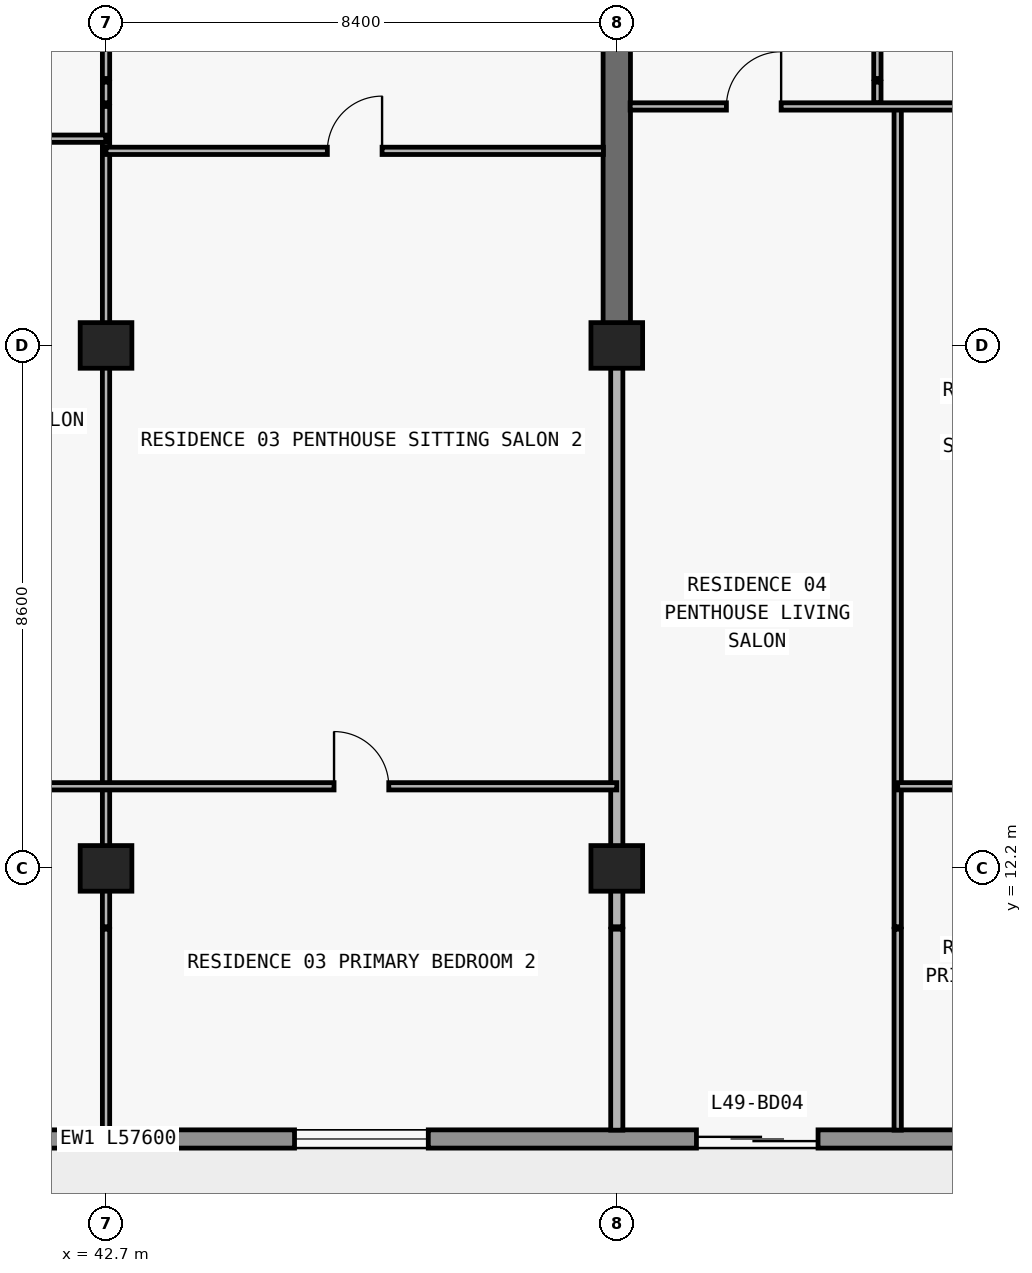
"""IFC4 building model, lengths in metres.
Left out: names, types, materials, properties, quantities, classifications, styles, units other than length and angle.
Written with IfcOpenShell. Run it as: python <this file> out.ifc"""

import sys

from ifc_helpers import new_model, si_unit, direction, frame, frame_2d, origin, origin_2d, place, context, subcontext, project, spatial, rectangle, extrude, element, fill, save


model = new_model("IFC4")
c1 = context("Model", 3, precision=1e-05, world=origin(), true_north=direction((0.0, 1.0)))
c2 = subcontext(c1, "Body", "Model", "MODEL_VIEW")
j1 = project(units=[si_unit("LENGTHUNIT", "METRE"), si_unit("PLANEANGLEUNIT", "RADIAN")], contexts=[c1])
p1 = place(None, origin())
s1 = spatial("IfcSite", under=j1, at=p1, CompositionType="ELEMENT")
p2 = place(p1, origin())
s2 = spatial("IfcBuilding", under=s1, at=p2, CompositionType="ELEMENT")
p3 = place(p2, frame((0.0, 0.0, 177.0)))
s3 = spatial("IfcBuildingStorey", under=s2, at=p3, CompositionType="ELEMENT", Elevation=177.0)
for number, where, z_axis, x_axis in (
    (1, (42.7, 12.2, 0.0), (0.0, 0.0, 1.0), (1.0, 0.0, 0.0)),
    (2, (51.1, 12.2, 0.0), (0.0, 0.0, 1.0), (1.0, 0.0, 0.0)),
    (3, (42.7, 20.8, 0.0), (0.0, 0.0, 1.0), (1.0, 0.0, 0.0)),
    (4, (51.1, 20.8, 0.0), (0.0, 0.0, 1.0), (1.0, 0.0, 0.0)),
):
    element("IfcColumn", number, at=place(p3, frame(where, z_axis=z_axis, x_axis=x_axis)), inside=s3, PredefinedType="COLUMN", context=c2, shape_type="SweptSolid", body=[
        extrude(rectangle(XDim=0.85, YDim=0.75, at=origin_2d()), origin(), (0.0, 0.0, 1.0), 3.05),
    ])
p4 = place(p3, frame((51.1, 20.8, 0.0), z_axis=(0.0, 0.0, 1.0), x_axis=(0.0, 1.0, 0.0)))
e5 = element("IfcWall", 5, at=p4, inside=s3, PredefinedType="SHEAR", context=c2, shape_type="SweptSolid", body=[
    extrude(rectangle(XDim=8.6, YDim=0.45, at=frame_2d((4.3, 0.0))), origin(), (0.0, 0.0, 1.0), 3.05),
])
p5 = place(p3, frame((67.7, 7.75, 0.0), z_axis=(0.0, 0.0, 1.0), x_axis=(-1.0, 0.0, 0.0)))
e6 = element("IfcWall", 6, at=p5, inside=s3, PredefinedType="STANDARD", context=c2, shape_type="SweptSolid", body=[
    extrude(rectangle(XDim=57.6, YDim=0.3, at=frame_2d((28.8, 0.0))), origin(), (0.0, 0.0, 1.0), 3.05),
])
p6 = place(p5, frame((54.673, 0.0, 0.0)))
e7 = element("IfcOpeningElement", 7, at=p6, cuts=e6, PredefinedType="OPENING", context=c2, shape_type="SweptSolid", body=[
    extrude(rectangle(XDim=2.0, YDim=2.3, at=frame_2d((1.0, 1.15))), frame((0.0, 0.16, 0.0), z_axis=(0.0, -1.0, 0.0), x_axis=(1.0, 0.0, 0.0)), (0.0, 0.0, 1.0), 0.32),
])
p7 = place(p5, frame((50.473, 0.0, 0.85)))
e8 = element("IfcOpeningElement", 8, at=p7, cuts=e6, PredefinedType="OPENING", context=c2, shape_type="SweptSolid", body=[
    extrude(rectangle(XDim=2.2, YDim=1.55, at=frame_2d((1.1, 0.775))), frame((0.0, 0.16, 0.0), z_axis=(0.0, -1.0, 0.0), x_axis=(1.0, 0.0, 0.0)), (0.0, 0.0, 1.0), 0.32),
])
p8 = place(p5, frame((46.09, 0.0, 0.0)))
e9 = element("IfcOpeningElement", 9, at=p8, cuts=e6, PredefinedType="OPENING", context=c2, shape_type="SweptSolid", body=[
    extrude(rectangle(XDim=2.0, YDim=2.3, at=frame_2d((1.0, 1.15))), frame((0.0, 0.16, 0.0), z_axis=(0.0, -1.0, 0.0), x_axis=(1.0, 0.0, 0.0)), (0.0, 0.0, 1.0), 0.32),
])
p9 = place(p5, frame((41.99, 0.0, 0.85)))
e10 = element("IfcOpeningElement", 10, at=p9, cuts=e6, PredefinedType="OPENING", context=c2, shape_type="SweptSolid", body=[
    extrude(rectangle(XDim=1.8, YDim=1.55, at=frame_2d((0.9, 0.775))), frame((0.0, 0.16, 0.0), z_axis=(0.0, -1.0, 0.0), x_axis=(1.0, 0.0, 0.0)), (0.0, 0.0, 1.0), 0.32),
])
p10 = place(p5, frame((38.09, 0.0, 0.0)))
e11 = element("IfcOpeningElement", 11, at=p10, cuts=e6, PredefinedType="OPENING", context=c2, shape_type="SweptSolid", body=[
    extrude(rectangle(XDim=2.0, YDim=2.3, at=frame_2d((1.0, 1.15))), frame((0.0, 0.16, 0.0), z_axis=(0.0, -1.0, 0.0), x_axis=(1.0, 0.0, 0.0)), (0.0, 0.0, 1.0), 0.32),
])
p11 = place(p5, frame((33.41, 0.0, 0.65)))
e12 = element("IfcOpeningElement", 12, at=p11, cuts=e6, PredefinedType="OPENING", context=c2, shape_type="SweptSolid", body=[
    extrude(rectangle(XDim=2.6, YDim=1.85, at=frame_2d((1.3, 0.925))), frame((0.0, 0.16, 0.0), z_axis=(0.0, -1.0, 0.0), x_axis=(1.0, 0.0, 0.0)), (0.0, 0.0, 1.0), 0.32),
])
p12 = place(p5, frame((27.7, 0.0, 0.85)))
e13 = element("IfcOpeningElement", 13, at=p12, cuts=e6, PredefinedType="OPENING", context=c2, shape_type="SweptSolid", body=[
    extrude(rectangle(XDim=2.2, YDim=1.55, at=frame_2d((1.1, 0.775))), frame((0.0, 0.16, 0.0), z_axis=(0.0, -1.0, 0.0), x_axis=(1.0, 0.0, 0.0)), (0.0, 0.0, 1.0), 0.32),
])
p13 = place(p5, frame((19.7, 0.0, 0.85)))
e14 = element("IfcOpeningElement", 14, at=p13, cuts=e6, PredefinedType="OPENING", context=c2, shape_type="SweptSolid", body=[
    extrude(rectangle(XDim=2.2, YDim=1.55, at=frame_2d((1.1, 0.775))), frame((0.0, 0.16, 0.0), z_axis=(0.0, -1.0, 0.0), x_axis=(1.0, 0.0, 0.0)), (0.0, 0.0, 1.0), 0.32),
])
p14 = place(p5, frame((13.29, 0.0, 0.0)))
e15 = element("IfcOpeningElement", 15, at=p14, cuts=e6, PredefinedType="OPENING", context=c2, shape_type="SweptSolid", body=[
    extrude(rectangle(XDim=2.0, YDim=2.3, at=frame_2d((1.0, 1.15))), frame((0.0, 0.16, 0.0), z_axis=(0.0, -1.0, 0.0), x_axis=(1.0, 0.0, 0.0)), (0.0, 0.0, 1.0), 0.32),
])
p15 = place(p5, frame((9.19, 0.0, 0.85)))
e16 = element("IfcOpeningElement", 16, at=p15, cuts=e6, PredefinedType="OPENING", context=c2, shape_type="SweptSolid", body=[
    extrude(rectangle(XDim=1.8, YDim=1.55, at=frame_2d((0.9, 0.775))), frame((0.0, 0.16, 0.0), z_axis=(0.0, -1.0, 0.0), x_axis=(1.0, 0.0, 0.0)), (0.0, 0.0, 1.0), 0.32),
])
p16 = place(p5, frame((5.273, 0.0, 0.0)))
e17 = element("IfcOpeningElement", 17, at=p16, cuts=e6, PredefinedType="OPENING", context=c2, shape_type="SweptSolid", body=[
    extrude(rectangle(XDim=2.0, YDim=2.3, at=frame_2d((1.0, 1.15))), frame((0.0, 0.16, 0.0), z_axis=(0.0, -1.0, 0.0), x_axis=(1.0, 0.0, 0.0)), (0.0, 0.0, 1.0), 0.32),
])
p17 = place(p5, frame((1.073, 0.0, 0.85)))
e18 = element("IfcOpeningElement", 18, at=p17, cuts=e6, PredefinedType="OPENING", context=c2, shape_type="SweptSolid", body=[
    extrude(rectangle(XDim=2.2, YDim=1.55, at=frame_2d((1.1, 0.775))), frame((0.0, 0.16, 0.0), z_axis=(0.0, -1.0, 0.0), x_axis=(1.0, 0.0, 0.0)), (0.0, 0.0, 1.0), 0.32),
])
p18 = place(p3, frame((42.7, 7.895, 0.0), z_axis=(0.0, 0.0, 1.0), x_axis=(0.0, 1.0, 0.0)))
e19 = element("IfcWall", 19, at=p18, inside=s3, PredefinedType="PARTITIONING", context=c2, shape_type="SweptSolid", body=[
    extrude(rectangle(XDim=3.305, YDim=0.12, at=frame_2d((1.652, 0.0))), origin(), (0.0, 0.0, 1.0), 3.05),
])
p19 = place(p3, frame((42.7, 11.24, 0.0), z_axis=(0.0, 0.0, 1.0), x_axis=(0.0, 1.0, 0.0)))
e20 = element("IfcWall", 20, at=p19, inside=s3, PredefinedType="PARTITIONING", context=c2, shape_type="SweptSolid", body=[
    extrude(rectangle(XDim=13.49, YDim=0.12, at=frame_2d((6.745, 0.0))), origin(), (0.0, 0.0, 1.0), 2.263),
])
p20 = place(p3, frame((42.7, 24.79, 0.0), z_axis=(0.0, 0.0, 1.0), x_axis=(0.0, 1.0, 0.0)))
e21 = element("IfcWall", 21, at=p20, inside=s3, PredefinedType="PARTITIONING", context=c2, shape_type="SweptSolid", body=[
    extrude(rectangle(XDim=0.34, YDim=0.12, at=frame_2d((0.17, 0.0))), origin(), (0.0, 0.0, 1.0), 2.263),
])
p21 = place(p3, frame((42.7, 25.19, 0.0), z_axis=(0.0, 0.0, 1.0), x_axis=(0.0, 1.0, 0.0)))
e22 = element("IfcWall", 22, at=p21, inside=s3, PredefinedType="PARTITIONING", context=c2, shape_type="SweptSolid", body=[
    extrude(rectangle(XDim=4.69, YDim=0.12, at=frame_2d((2.345, 0.0))), origin(), (0.0, 0.0, 1.0), 2.263),
])
p22 = place(p21, frame((1.255, 0.0, 0.0)))
e23 = element("IfcOpeningElement", 23, at=p22, cuts=e22, PredefinedType="OPENING", context=c2, shape_type="SweptSolid", body=[
    extrude(rectangle(XDim=0.9, YDim=2.15, at=frame_2d((0.45, 1.075))), frame((0.0, 0.07, 0.0), z_axis=(0.0, -1.0, 0.0), x_axis=(1.0, 0.0, 0.0)), (0.0, 0.0, 1.0), 0.14),
])
p23 = place(p3, frame((51.1, 7.895, 0.0), z_axis=(0.0, 0.0, 1.0), x_axis=(0.0, 1.0, 0.0)))
e24 = element("IfcWall", 24, at=p23, inside=s3, PredefinedType="PARTITIONING", context=c2, shape_type="SweptSolid", body=[
    extrude(rectangle(XDim=3.305, YDim=0.2, at=frame_2d((1.652, 0.0))), origin(), (0.0, 0.0, 1.0), 3.05),
])
p24 = place(p3, frame((51.1, 11.24, 0.0), z_axis=(0.0, 0.0, 1.0), x_axis=(0.0, 1.0, 0.0)))
e25 = element("IfcWall", 25, at=p24, inside=s3, PredefinedType="PARTITIONING", context=c2, shape_type="SweptSolid", body=[
    extrude(rectangle(XDim=9.555, YDim=0.2, at=frame_2d((4.777, 0.0))), origin(), (0.0, 0.0, 1.0), 2.263),
])
p25 = place(p3, frame((55.386, 24.79, 0.0), z_axis=(0.0, 0.0, 1.0), x_axis=(0.0, 1.0, 0.0)))
e26 = element("IfcWall", 26, at=p25, inside=s3, PredefinedType="PARTITIONING", context=c2, shape_type="SweptSolid", body=[
    extrude(rectangle(XDim=0.34, YDim=0.12, at=frame_2d((0.17, 0.0))), origin(), (0.0, 0.0, 1.0), 2.499),
])
p26 = place(p3, frame((55.386, 25.19, 0.0), z_axis=(0.0, 0.0, 1.0), x_axis=(0.0, 1.0, 0.0)))
e27 = element("IfcWall", 27, at=p26, inside=s3, PredefinedType="PARTITIONING", context=c2, shape_type="SweptSolid", body=[
    extrude(rectangle(XDim=4.69, YDim=0.12, at=frame_2d((2.345, 0.0))), origin(), (0.0, 0.0, 1.0), 2.499),
])
p27 = place(p26, frame((1.895, 0.0, 0.0)))
e28 = element("IfcOpeningElement", 28, at=p27, cuts=e27, PredefinedType="OPENING", context=c2, shape_type="SweptSolid", body=[
    extrude(rectangle(XDim=0.9, YDim=2.15, at=frame_2d((0.45, 1.075))), frame((0.0, 0.07, 0.0), z_axis=(0.0, -1.0, 0.0), x_axis=(1.0, 0.0, 0.0)), (0.0, 0.0, 1.0), 0.14),
])
p28 = place(p3, frame((55.72, 7.895, 0.0), z_axis=(0.0, 0.0, 1.0), x_axis=(0.0, 1.0, 0.0)))
e29 = element("IfcWall", 29, at=p28, inside=s3, PredefinedType="PARTITIONING", context=c2, shape_type="SweptSolid", body=[
    extrude(rectangle(XDim=3.305, YDim=0.12, at=frame_2d((1.652, 0.0))), origin(), (0.0, 0.0, 1.0), 3.05),
])
p29 = place(p3, frame((55.72, 11.24, 0.0), z_axis=(0.0, 0.0, 1.0), x_axis=(0.0, 1.0, 0.0)))
e30 = element("IfcWall", 30, at=p29, inside=s3, PredefinedType="PARTITIONING", context=c2, shape_type="SweptSolid", body=[
    extrude(rectangle(XDim=13.49, YDim=0.12, at=frame_2d((6.745, 0.0))), origin(), (0.0, 0.0, 1.0), 3.05),
])
p30 = place(p3, frame((35.1, 13.55, 0.0), z_axis=(0.0, 0.0, 1.0), x_axis=(1.0, 0.0, 0.0)))
e31 = element("IfcWall", 31, at=p30, inside=s3, PredefinedType="PARTITIONING", context=c2, shape_type="SweptSolid", body=[
    extrude(rectangle(XDim=16.0, YDim=0.12, at=frame_2d((8.0, 0.0))), origin(), (0.0, 0.0, 1.0), 3.05),
])
p31 = place(p30, frame((3.35, 0.0, 0.0)))
e32 = element("IfcOpeningElement", 32, at=p31, cuts=e31, PredefinedType="OPENING", context=c2, shape_type="SweptSolid", body=[
    extrude(rectangle(XDim=0.9, YDim=2.15, at=frame_2d((0.45, 1.075))), frame((0.0, 0.07, 0.0), z_axis=(0.0, -1.0, 0.0), x_axis=(1.0, 0.0, 0.0)), (0.0, 0.0, 1.0), 0.14),
])
p32 = place(p30, frame((11.35, 0.0, 0.0)))
e33 = element("IfcOpeningElement", 33, at=p32, cuts=e31, PredefinedType="OPENING", context=c2, shape_type="SweptSolid", body=[
    extrude(rectangle(XDim=0.9, YDim=2.15, at=frame_2d((0.45, 1.075))), frame((0.0, 0.07, 0.0), z_axis=(0.0, -1.0, 0.0), x_axis=(1.0, 0.0, 0.0)), (0.0, 0.0, 1.0), 0.14),
])
p33 = place(p3, frame((55.72, 13.55, 0.0), z_axis=(0.0, 0.0, 1.0), x_axis=(1.0, 0.0, 0.0)))
e34 = element("IfcWall", 34, at=p33, inside=s3, PredefinedType="PARTITIONING", context=c2, shape_type="SweptSolid", body=[
    extrude(rectangle(XDim=3.78, YDim=0.12, at=frame_2d((1.89, 0.0))), origin(), (0.0, 0.0, 1.0), 3.05),
])
p34 = place(p33, frame((1.44, 0.0, 0.0)))
e35 = element("IfcOpeningElement", 35, at=p34, cuts=e34, PredefinedType="OPENING", context=c2, shape_type="SweptSolid", body=[
    extrude(rectangle(XDim=0.9, YDim=2.15, at=frame_2d((0.45, 1.075))), frame((0.0, 0.07, 0.0), z_axis=(0.0, -1.0, 0.0), x_axis=(1.0, 0.0, 0.0)), (0.0, 0.0, 1.0), 0.14),
])
p35 = place(p3, frame((42.7, 24.0, 0.0), z_axis=(0.0, 0.0, 1.0), x_axis=(1.0, 0.0, 0.0)))
e36 = element("IfcWall", 36, at=p35, inside=s3, PredefinedType="PARTITIONING", context=c2, shape_type="SweptSolid", body=[
    extrude(rectangle(XDim=8.18, YDim=0.12, at=frame_2d((4.09, 0.0))), origin(), (0.0, 0.0, 1.0), 3.05),
])
p36 = place(p35, frame((3.64, 0.0, 0.0)))
e37 = element("IfcOpeningElement", 37, at=p36, cuts=e36, PredefinedType="OPENING", context=c2, shape_type="SweptSolid", body=[
    extrude(rectangle(XDim=0.9, YDim=2.15, at=frame_2d((0.45, 1.075))), frame((0.0, 0.07, 0.0), z_axis=(0.0, -1.0, 0.0), x_axis=(1.0, 0.0, 0.0)), (0.0, 0.0, 1.0), 0.14),
])
p37 = place(p3, frame((35.105, 24.2, 0.0), z_axis=(0.0, 0.0, 1.0), x_axis=(1.0, 0.0, 0.0)))
e38 = element("IfcWall", 38, at=p37, inside=s3, PredefinedType="PARTITIONING", context=c2, shape_type="SweptSolid", body=[
    extrude(rectangle(XDim=7.59, YDim=0.12, at=frame_2d((3.795, 0.0))), origin(), (0.0, 0.0, 1.0), 3.05),
])
p38 = place(p37, frame((3.345, 0.0, 0.0)))
e39 = element("IfcOpeningElement", 39, at=p38, cuts=e38, PredefinedType="OPENING", context=c2, shape_type="SweptSolid", body=[
    extrude(rectangle(XDim=0.9, YDim=2.15, at=frame_2d((0.45, 1.075))), frame((0.0, 0.07, 0.0), z_axis=(0.0, -1.0, 0.0), x_axis=(1.0, 0.0, 0.0)), (0.0, 0.0, 1.0), 0.14),
])
p39 = place(p3, frame((51.32, 24.73, 0.0), z_axis=(0.0, 0.0, 1.0), x_axis=(1.0, 0.0, 0.0)))
e40 = element("IfcWall", 40, at=p39, inside=s3, PredefinedType="PARTITIONING", context=c2, shape_type="SweptSolid", body=[
    extrude(rectangle(XDim=8.18, YDim=0.12, at=frame_2d((4.09, 0.0))), origin(), (0.0, 0.0, 1.0), 3.05),
])
p40 = place(p39, frame((1.583, 0.0, 0.0)))
e41 = element("IfcOpeningElement", 41, at=p40, cuts=e40, PredefinedType="OPENING", context=c2, shape_type="SweptSolid", body=[
    extrude(rectangle(XDim=0.9, YDim=2.15, at=frame_2d((0.45, 1.075))), frame((0.0, 0.07, 0.0), z_axis=(0.0, -1.0, 0.0), x_axis=(1.0, 0.0, 0.0)), (0.0, 0.0, 1.0), 0.14),
])
p41 = place(p39, frame((5.84, 0.0, 0.0)))
e42 = element("IfcOpeningElement", 42, at=p41, cuts=e40, PredefinedType="OPENING", context=c2, shape_type="SweptSolid", body=[
    extrude(rectangle(XDim=0.9, YDim=2.15, at=frame_2d((0.45, 1.075))), frame((0.0, 0.07, 0.0), z_axis=(0.0, -1.0, 0.0), x_axis=(1.0, 0.0, 0.0)), (0.0, 0.0, 1.0), 0.14),
])
p42 = place(p13, origin())
e43 = element("IfcWindow", 43, at=p42, inside=s3, PartitioningType="SINGLE_PANEL", PredefinedType="WINDOW", context=c2, shape_type="SweptSolid", body=[
    extrude(rectangle(XDim=2.2, YDim=1.55, at=frame_2d((1.1, 0.775))), frame((0.0, 0.03, 0.0), z_axis=(0.0, -1.0, 0.0), x_axis=(1.0, 0.0, 0.0)), (0.0, 0.0, 1.0), 0.06),
])
fill(e14, e43)
p43 = place(p14, origin())
e44 = element("IfcDoor", 44, at=p43, inside=s3, OperationType="DOUBLE_DOOR_SLIDING", PredefinedType="DOOR", context=c2, shape_type="SweptSolid", body=[
    extrude(rectangle(XDim=2.0, YDim=2.3, at=frame_2d((1.0, 1.15))), frame((0.0, 0.025, 0.0), z_axis=(0.0, -1.0, 0.0), x_axis=(1.0, 0.0, 0.0)), (0.0, 0.0, 1.0), 0.05),
])
fill(e15, e44)
p44 = place(p36, origin())
e45 = element("IfcDoor", 45, at=p44, inside=s3, OperationType="SINGLE_SWING_RIGHT", PredefinedType="DOOR", context=c2, shape_type="SweptSolid", body=[
    extrude(rectangle(XDim=0.9, YDim=2.15, at=frame_2d((0.45, 1.075))), frame((0.0, 0.025, 0.0), z_axis=(0.0, -1.0, 0.0), x_axis=(1.0, 0.0, 0.0)), (0.0, 0.0, 1.0), 0.05),
])
fill(e37, e45)
p45 = place(p32, origin())
e46 = element("IfcDoor", 46, at=p45, inside=s3, OperationType="SINGLE_SWING_LEFT", PredefinedType="DOOR", context=c2, shape_type="SweptSolid", body=[
    extrude(rectangle(XDim=0.9, YDim=2.15, at=frame_2d((0.45, 1.075))), frame((0.0, 0.025, 0.0), z_axis=(0.0, -1.0, 0.0), x_axis=(1.0, 0.0, 0.0)), (0.0, 0.0, 1.0), 0.05),
])
fill(e33, e46)
p46 = place(p40, origin())
e47 = element("IfcDoor", 47, at=p46, inside=s3, OperationType="SINGLE_SWING_RIGHT", PredefinedType="DOOR", context=c2, shape_type="SweptSolid", body=[
    extrude(rectangle(XDim=0.9, YDim=2.15, at=frame_2d((0.45, 1.075))), frame((0.0, 0.025, 0.0), z_axis=(0.0, -1.0, 0.0), x_axis=(1.0, 0.0, 0.0)), (0.0, 0.0, 1.0), 0.05),
])
fill(e41, e47)
save(model, sys.argv[1])
